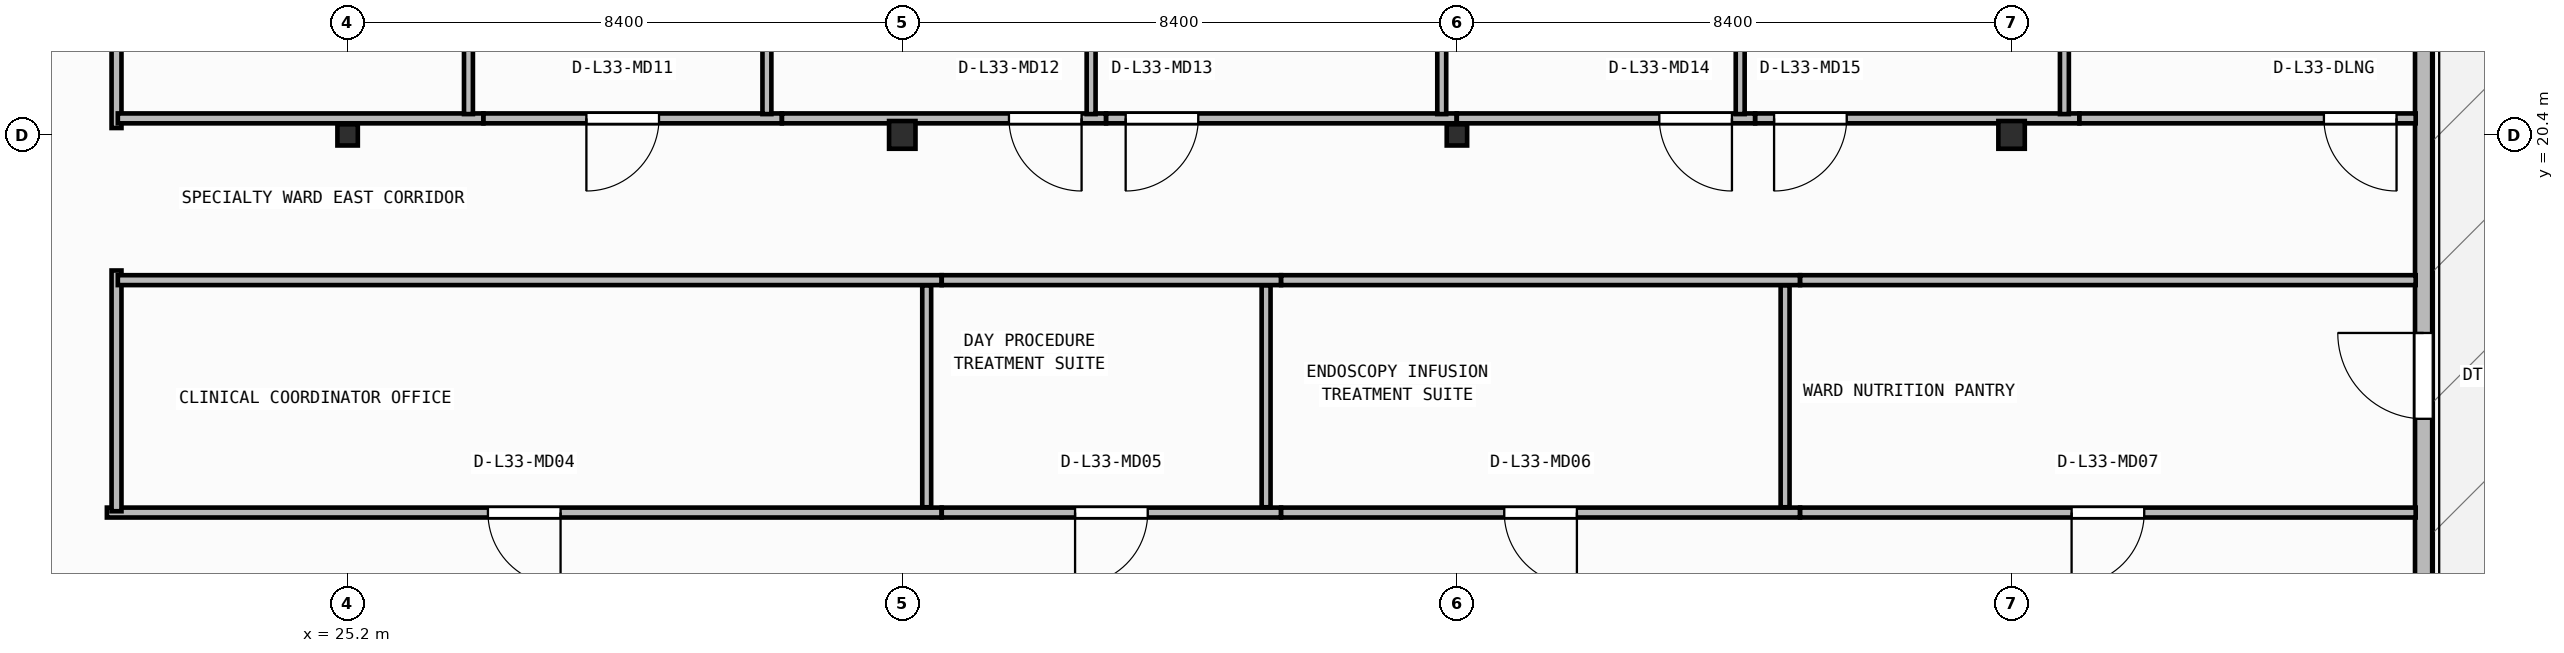
"""IFC4 building model, lengths in metres.
Left out: names, types, materials, properties, quantities, classifications, styles, units other than length and angle.
Written with IfcOpenShell. Run it as: python <this file> out.ifc"""

import sys

from ifc_helpers import new_model, si_unit, direction, frame, frame_2d, origin, origin_2d, place, context, subcontext, project, spatial, rectangle, i_section, extrude, element, fill, save


model = new_model("IFC4")
c1 = context("Model", 3, precision=1e-05, world=origin(), true_north=direction((0.0, 1.0)))
c2 = subcontext(c1, "Body", "Model", "MODEL_VIEW")
j1 = project(units=[si_unit("LENGTHUNIT", "METRE"), si_unit("PLANEANGLEUNIT", "RADIAN")], contexts=[c1])
p1 = place(None, origin())
s1 = spatial("IfcSite", under=j1, at=p1, CompositionType="ELEMENT")
p2 = place(p1, origin())
s2 = spatial("IfcBuilding", under=s1, at=p2, CompositionType="ELEMENT")
p3 = place(p2, frame((0.0, 0.0, 134.95)))
s3 = spatial("IfcBuildingStorey", under=s2, at=p3, CompositionType="ELEMENT", Elevation=134.95)
p4 = place(p3, frame((25.2, 20.4, 0.0), z_axis=(0.0, 0.0, 1.0), x_axis=(1.0, 0.0, 0.0)))
e1 = element("IfcColumn", 1, at=p4, inside=s3, PredefinedType="COLUMN", context=c2, shape_type="SweptSolid", body=[
    extrude(i_section(OverallWidth=0.309, OverallDepth=0.321, WebThickness=0.014, FlangeThickness=0.022, FilletRadius=0.017, at=origin_2d()), origin(), (0.0, 0.0, 1.0), 3.95),
])
p5 = place(p3, frame((33.6, 20.4, 0.0), z_axis=(0.0, 0.0, 1.0), x_axis=(1.0, 0.0, 0.0)))
e2 = element("IfcColumn", 2, at=p5, inside=s3, PredefinedType="COLUMN", context=c2, shape_type="SweptSolid", body=[
    extrude(i_section(OverallWidth=0.4, OverallDepth=0.42, WebThickness=0.025, FlangeThickness=0.04, at=origin_2d()), origin(), (0.0, 0.0, 1.0), 3.95),
])
p6 = place(p3, frame((42.0, 20.4, 0.0), z_axis=(0.0, 0.0, 1.0), x_axis=(1.0, 0.0, 0.0)))
e3 = element("IfcColumn", 3, at=p6, inside=s3, PredefinedType="COLUMN", context=c2, shape_type="SweptSolid", body=[
    extrude(i_section(OverallWidth=0.309, OverallDepth=0.321, WebThickness=0.014, FlangeThickness=0.022, FilletRadius=0.017, at=origin_2d()), origin(), (0.0, 0.0, 1.0), 3.95),
])
p7 = place(p3, frame((50.4, 20.4, 0.0), z_axis=(0.0, 0.0, 1.0), x_axis=(1.0, 0.0, 0.0)))
e4 = element("IfcColumn", 4, at=p7, inside=s3, PredefinedType="COLUMN", context=c2, shape_type="SweptSolid", body=[
    extrude(i_section(OverallWidth=0.4, OverallDepth=0.42, WebThickness=0.025, FlangeThickness=0.04, at=origin_2d()), origin(), (0.0, 0.0, 1.0), 3.95),
])
p8 = place(p3, frame((56.64, 6.86, 0.0), z_axis=(0.0, 0.0, 1.0), x_axis=(0.0, 1.0, 0.0)))
e5 = element("IfcWall", 5, at=p8, inside=s3, PredefinedType="STANDARD", context=c2, shape_type="SweptSolid", body=[
    extrude(rectangle(XDim=23.48, YDim=0.26, at=frame_2d((11.74, 0.0))), origin(), (0.0, 0.0, 1.0), 3.71),
])
p9 = place(p8, frame((9.24, 0.0, 0.0)))
e6 = element("IfcOpeningElement", 6, at=p9, cuts=e5, PredefinedType="OPENING", context=c2, shape_type="SweptSolid", body=[
    extrude(rectangle(XDim=1.3, YDim=2.15, at=frame_2d((0.65, 1.075))), frame((0.0, 0.14, 0.0), z_axis=(0.0, -1.0, 0.0), x_axis=(1.0, 0.0, 0.0)), (0.0, 0.0, 1.0), 0.28),
])
p10 = place(p3, frame((34.196, 14.68, 0.0), z_axis=(0.0, 0.0, 1.0), x_axis=(-1.0, 0.0, 0.0)))
e7 = element("IfcWall", 7, at=p10, inside=s3, PredefinedType="PARTITIONING", context=c2, shape_type="SweptSolid", body=[
    extrude(rectangle(XDim=12.642, YDim=0.15, at=frame_2d((6.321, 0.0))), origin(), (0.0, 0.0, 1.0), 3.71),
])
p11 = place(p10, frame((5.771, 0.0, 0.0)))
e8 = element("IfcOpeningElement", 8, at=p11, cuts=e7, PredefinedType="OPENING", context=c2, shape_type="SweptSolid", body=[
    extrude(rectangle(XDim=1.1, YDim=2.1, at=frame_2d((0.55, 1.05))), frame((0.0, 0.085, 0.0), z_axis=(0.0, -1.0, 0.0), x_axis=(1.0, 0.0, 0.0)), (0.0, 0.0, 1.0), 0.17),
])
p12 = place(p3, frame((39.336, 14.68, 0.0), z_axis=(0.0, 0.0, 1.0), x_axis=(-1.0, 0.0, 0.0)))
e9 = element("IfcWall", 9, at=p12, inside=s3, PredefinedType="PARTITIONING", context=c2, shape_type="SweptSolid", body=[
    extrude(rectangle(XDim=5.138, YDim=0.15, at=frame_2d((2.569, 0.0))), origin(), (0.0, 0.0, 1.0), 3.71),
])
p13 = place(p12, frame((2.019, 0.0, 0.0)))
e10 = element("IfcOpeningElement", 10, at=p13, cuts=e9, PredefinedType="OPENING", context=c2, shape_type="SweptSolid", body=[
    extrude(rectangle(XDim=1.1, YDim=2.1, at=frame_2d((0.55, 1.05))), frame((0.0, 0.085, 0.0), z_axis=(0.0, -1.0, 0.0), x_axis=(1.0, 0.0, 0.0)), (0.0, 0.0, 1.0), 0.17),
])
p14 = place(p3, frame((47.196, 14.68, 0.0), z_axis=(0.0, 0.0, 1.0), x_axis=(-1.0, 0.0, 0.0)))
e11 = element("IfcWall", 11, at=p14, inside=s3, PredefinedType="PARTITIONING", context=c2, shape_type="SweptSolid", body=[
    extrude(rectangle(XDim=7.858, YDim=0.15, at=frame_2d((3.929, 0.0))), origin(), (0.0, 0.0, 1.0), 3.71),
])
p15 = place(p14, frame((3.379, 0.0, 0.0)))
e12 = element("IfcOpeningElement", 12, at=p15, cuts=e11, PredefinedType="OPENING", context=c2, shape_type="SweptSolid", body=[
    extrude(rectangle(XDim=1.1, YDim=2.1, at=frame_2d((0.55, 1.05))), frame((0.0, 0.085, 0.0), z_axis=(0.0, -1.0, 0.0), x_axis=(1.0, 0.0, 0.0)), (0.0, 0.0, 1.0), 0.17),
])
p16 = place(p3, frame((56.52, 14.68, 0.0), z_axis=(0.0, 0.0, 1.0), x_axis=(-1.0, 0.0, 0.0)))
e13 = element("IfcWall", 13, at=p16, inside=s3, PredefinedType="PARTITIONING", context=c2, shape_type="SweptSolid", body=[
    extrude(rectangle(XDim=9.322, YDim=0.15, at=frame_2d((4.661, 0.0))), origin(), (0.0, 0.0, 1.0), 3.71),
])
p17 = place(p16, frame((4.111, 0.0, 0.0)))
e14 = element("IfcOpeningElement", 14, at=p17, cuts=e13, PredefinedType="OPENING", context=c2, shape_type="SweptSolid", body=[
    extrude(rectangle(XDim=1.1, YDim=2.1, at=frame_2d((0.55, 1.05))), frame((0.0, 0.085, 0.0), z_axis=(0.0, -1.0, 0.0), x_axis=(1.0, 0.0, 0.0)), (0.0, 0.0, 1.0), 0.17),
])
p18 = place(p3, frame((21.7, 14.7, 0.0), z_axis=(0.0, 0.0, 1.0), x_axis=(0.0, 1.0, 0.0)))
e15 = element("IfcWall", 15, at=p18, inside=s3, PredefinedType="PARTITIONING", context=c2, shape_type="SweptSolid", body=[
    extrude(rectangle(XDim=3.646, YDim=0.15, at=frame_2d((1.823, 0.0))), origin(), (0.0, 0.0, 1.0), 3.71),
])
p19 = place(p3, frame((21.7, 20.504, 0.0), z_axis=(0.0, 0.0, 1.0), x_axis=(0.0, 1.0, 0.0)))
e16 = element("IfcWall", 16, at=p19, inside=s3, PredefinedType="PARTITIONING", context=c2, shape_type="SweptSolid", body=[
    extrude(rectangle(XDim=6.756, YDim=0.15, at=frame_2d((3.378, 0.0))), origin(), (0.0, 0.0, 1.0), 3.71),
])
p20 = place(p19, frame((2.828, 0.0, 0.0)))
e17 = element("IfcOpeningElement", 17, at=p20, cuts=e16, PredefinedType="OPENING", context=c2, shape_type="SweptSolid", body=[
    extrude(rectangle(XDim=1.1, YDim=2.1, at=frame_2d((0.55, 1.05))), frame((0.0, 0.085, 0.0), z_axis=(0.0, -1.0, 0.0), x_axis=(1.0, 0.0, 0.0)), (0.0, 0.0, 1.0), 0.17),
])
p21 = place(p3, frame((21.72, 18.2, 0.0), z_axis=(0.0, 0.0, 1.0), x_axis=(1.0, 0.0, 0.0)))
e18 = element("IfcWall", 18, at=p21, inside=s3, PredefinedType="PARTITIONING", context=c2, shape_type="SweptSolid", body=[
    extrude(rectangle(XDim=12.476, YDim=0.15, at=frame_2d((6.238, 0.0))), origin(), (0.0, 0.0, 1.0), 3.71),
])
p22 = place(p3, frame((34.198, 18.2, 0.0), z_axis=(0.0, 0.0, 1.0), x_axis=(1.0, 0.0, 0.0)))
e19 = element("IfcWall", 19, at=p22, inside=s3, PredefinedType="PARTITIONING", context=c2, shape_type="SweptSolid", body=[
    extrude(rectangle(XDim=5.138, YDim=0.15, at=frame_2d((2.569, 0.0))), origin(), (0.0, 0.0, 1.0), 3.71),
])
p23 = place(p3, frame((39.338, 18.2, 0.0), z_axis=(0.0, 0.0, 1.0), x_axis=(1.0, 0.0, 0.0)))
e20 = element("IfcWall", 20, at=p23, inside=s3, PredefinedType="PARTITIONING", context=c2, shape_type="SweptSolid", body=[
    extrude(rectangle(XDim=7.858, YDim=0.15, at=frame_2d((3.929, 0.0))), origin(), (0.0, 0.0, 1.0), 3.71),
])
p24 = place(p3, frame((47.198, 18.2, 0.0), z_axis=(0.0, 0.0, 1.0), x_axis=(1.0, 0.0, 0.0)))
e21 = element("IfcWall", 21, at=p24, inside=s3, PredefinedType="PARTITIONING", context=c2, shape_type="SweptSolid", body=[
    extrude(rectangle(XDim=9.322, YDim=0.15, at=frame_2d((4.661, 0.0))), origin(), (0.0, 0.0, 1.0), 3.71),
])
p25 = place(p3, frame((27.256, 20.65, 0.0), z_axis=(0.0, 0.0, 1.0), x_axis=(-1.0, 0.0, 0.0)))
e22 = element("IfcWall", 22, at=p25, inside=s3, PredefinedType="PARTITIONING", context=c2, shape_type="SweptSolid", body=[
    extrude(rectangle(XDim=5.536, YDim=0.15, at=frame_2d((2.768, 0.0))), origin(), (0.0, 0.0, 1.0), 3.083),
])
p26 = place(p3, frame((31.776, 20.65, 0.0), z_axis=(0.0, 0.0, 1.0), x_axis=(-1.0, 0.0, 0.0)))
e23 = element("IfcWall", 23, at=p26, inside=s3, PredefinedType="PARTITIONING", context=c2, shape_type="SweptSolid", body=[
    extrude(rectangle(XDim=4.518, YDim=0.15, at=frame_2d((2.259, 0.0))), origin(), (0.0, 0.0, 1.0), 3.083),
])
p27 = place(p26, frame((1.86, 0.0, 0.0)))
e24 = element("IfcOpeningElement", 24, at=p27, cuts=e23, PredefinedType="OPENING", context=c2, shape_type="SweptSolid", body=[
    extrude(rectangle(XDim=1.1, YDim=2.1, at=frame_2d((0.55, 1.05))), frame((0.0, 0.085, 0.0), z_axis=(0.0, -1.0, 0.0), x_axis=(1.0, 0.0, 0.0)), (0.0, 0.0, 1.0), 0.17),
])
p28 = place(p3, frame((36.686, 20.65, 0.0), z_axis=(0.0, 0.0, 1.0), x_axis=(-1.0, 0.0, 0.0)))
e25 = element("IfcWall", 25, at=p28, inside=s3, PredefinedType="PARTITIONING", context=c2, shape_type="SweptSolid", body=[
    extrude(rectangle(XDim=4.908, YDim=0.15, at=frame_2d((2.454, 0.0))), origin(), (0.0, 0.0, 1.0), 3.083),
])
p29 = place(p28, frame((0.37, 0.0, 0.0)))
e26 = element("IfcOpeningElement", 26, at=p29, cuts=e25, PredefinedType="OPENING", context=c2, shape_type="SweptSolid", body=[
    extrude(rectangle(XDim=1.1, YDim=2.1, at=frame_2d((0.55, 1.05))), frame((0.0, 0.085, 0.0), z_axis=(0.0, -1.0, 0.0), x_axis=(1.0, 0.0, 0.0)), (0.0, 0.0, 1.0), 0.17),
])
p30 = place(p3, frame((41.996, 20.65, 0.0), z_axis=(0.0, 0.0, 1.0), x_axis=(-1.0, 0.0, 0.0)))
e27 = element("IfcWall", 27, at=p30, inside=s3, PredefinedType="PARTITIONING", context=c2, shape_type="SweptSolid", body=[
    extrude(rectangle(XDim=5.308, YDim=0.15, at=frame_2d((2.654, 0.0))), origin(), (0.0, 0.0, 1.0), 3.083),
])
p31 = place(p30, frame((3.913, 0.0, 0.0)))
e28 = element("IfcOpeningElement", 28, at=p31, cuts=e27, PredefinedType="OPENING", context=c2, shape_type="SweptSolid", body=[
    extrude(rectangle(XDim=1.1, YDim=2.1, at=frame_2d((0.55, 1.05))), frame((0.0, 0.085, 0.0), z_axis=(0.0, -1.0, 0.0), x_axis=(1.0, 0.0, 0.0)), (0.0, 0.0, 1.0), 0.17),
])
p32 = place(p3, frame((46.516, 20.65, 0.0), z_axis=(0.0, 0.0, 1.0), x_axis=(-1.0, 0.0, 0.0)))
e29 = element("IfcWall", 29, at=p32, inside=s3, PredefinedType="PARTITIONING", context=c2, shape_type="SweptSolid", body=[
    extrude(rectangle(XDim=4.518, YDim=0.15, at=frame_2d((2.259, 0.0))), origin(), (0.0, 0.0, 1.0), 3.083),
])
p33 = place(p32, frame((0.351, 0.0, 0.0)))
e30 = element("IfcOpeningElement", 30, at=p33, cuts=e29, PredefinedType="OPENING", context=c2, shape_type="SweptSolid", body=[
    extrude(rectangle(XDim=1.1, YDim=2.1, at=frame_2d((0.55, 1.05))), frame((0.0, 0.085, 0.0), z_axis=(0.0, -1.0, 0.0), x_axis=(1.0, 0.0, 0.0)), (0.0, 0.0, 1.0), 0.17),
])
p34 = place(p3, frame((51.426, 20.65, 0.0), z_axis=(0.0, 0.0, 1.0), x_axis=(-1.0, 0.0, 0.0)))
e31 = element("IfcWall", 31, at=p34, inside=s3, PredefinedType="PARTITIONING", context=c2, shape_type="SweptSolid", body=[
    extrude(rectangle(XDim=4.908, YDim=0.15, at=frame_2d((2.454, 0.0))), origin(), (0.0, 0.0, 1.0), 3.083),
])
p35 = place(p34, frame((3.523, 0.0, 0.0)))
e32 = element("IfcOpeningElement", 32, at=p35, cuts=e31, PredefinedType="OPENING", context=c2, shape_type="SweptSolid", body=[
    extrude(rectangle(XDim=1.1, YDim=2.1, at=frame_2d((0.55, 1.05))), frame((0.0, 0.085, 0.0), z_axis=(0.0, -1.0, 0.0), x_axis=(1.0, 0.0, 0.0)), (0.0, 0.0, 1.0), 0.17),
])
p36 = place(p3, frame((56.52, 20.65, 0.0), z_axis=(0.0, 0.0, 1.0), x_axis=(-1.0, 0.0, 0.0)))
e33 = element("IfcWall", 33, at=p36, inside=s3, PredefinedType="PARTITIONING", context=c2, shape_type="SweptSolid", body=[
    extrude(rectangle(XDim=5.092, YDim=0.15, at=frame_2d((2.546, 0.0))), origin(), (0.0, 0.0, 1.0), 3.71),
])
p37 = place(p36, frame((0.29, 0.0, 0.0)))
e34 = element("IfcOpeningElement", 34, at=p37, cuts=e33, PredefinedType="OPENING", context=c2, shape_type="SweptSolid", body=[
    extrude(rectangle(XDim=1.1, YDim=2.1, at=frame_2d((0.55, 1.05))), frame((0.0, 0.085, 0.0), z_axis=(0.0, -1.0, 0.0), x_axis=(1.0, 0.0, 0.0)), (0.0, 0.0, 1.0), 0.17),
])
p38 = place(p3, frame((33.97, 14.76, 0.0), z_axis=(0.0, 0.0, 1.0), x_axis=(0.0, 1.0, 0.0)))
e35 = element("IfcWall", 35, at=p38, inside=s3, PredefinedType="PARTITIONING", context=c2, shape_type="SweptSolid", body=[
    extrude(rectangle(XDim=3.36, YDim=0.135, at=frame_2d((1.68, 0.0))), origin(), (0.0, 0.0, 1.0), 3.152),
])
for number, where, z_axis, x_axis in (
    (36, (39.11, 14.76, 0.0), (0.0, 0.0, 1.0), (0.0, 1.0, 0.0)),
    (37, (46.97, 14.76, 0.0), (0.0, 0.0, 1.0), (0.0, 1.0, 0.0)),
):
    element("IfcWall", number, at=place(p3, frame(where, z_axis=z_axis, x_axis=x_axis)), inside=s3, PredefinedType="PARTITIONING", context=c2, shape_type="SweptSolid", body=[
        extrude(rectangle(XDim=3.36, YDim=0.135, at=frame_2d((1.68, 0.0))), origin(), (0.0, 0.0, 1.0), 3.71),
    ])
for number, where, z_axis, x_axis in (
    (38, (27.03, 20.715, 0.0), (0.0, 0.0, 1.0), (0.0, 1.0, 0.0)),
    (39, (31.55, 20.715, 0.0), (0.0, 0.0, 1.0), (0.0, 1.0, 0.0)),
    (40, (36.46, 20.715, 0.0), (0.0, 0.0, 1.0), (0.0, 1.0, 0.0)),
):
    element("IfcWall", number, at=place(p3, frame(where, z_axis=z_axis, x_axis=x_axis)), inside=s3, PredefinedType="PARTITIONING", context=c2, shape_type="SweptSolid", body=[
        extrude(rectangle(XDim=6.385, YDim=0.135, at=frame_2d((3.192, 0.0))), origin(), (0.0, 0.0, 1.0), 3.71),
    ])
p39 = place(p3, frame((41.77, 20.715, 0.0), z_axis=(0.0, 0.0, 1.0), x_axis=(0.0, 1.0, 0.0)))
e41 = element("IfcWall", 41, at=p39, inside=s3, PredefinedType="PARTITIONING", context=c2, shape_type="SweptSolid", body=[
    extrude(rectangle(XDim=6.385, YDim=0.135, at=frame_2d((3.192, 0.0))), origin(), (0.0, 0.0, 1.0), 3.152),
])
for number, where, z_axis, x_axis in (
    (42, (46.29, 20.715, 0.0), (0.0, 0.0, 1.0), (0.0, 1.0, 0.0)),
    (43, (51.2, 20.715, 0.0), (0.0, 0.0, 1.0), (0.0, 1.0, 0.0)),
):
    element("IfcWall", number, at=place(p3, frame(where, z_axis=z_axis, x_axis=x_axis)), inside=s3, PredefinedType="PARTITIONING", context=c2, shape_type="SweptSolid", body=[
        extrude(rectangle(XDim=6.385, YDim=0.135, at=frame_2d((3.192, 0.0))), origin(), (0.0, 0.0, 1.0), 3.71),
    ])
p40 = place(p9, origin())
e44 = element("IfcDoor", 44, at=p40, inside=s3, OperationType="SINGLE_SWING_RIGHT", PredefinedType="DOOR", context=c2, shape_type="SweptSolid", body=[
    extrude(rectangle(XDim=1.3, YDim=2.15, at=frame_2d((0.65, 1.075))), frame((0.0, 0.025, 0.0), z_axis=(0.0, -1.0, 0.0), x_axis=(1.0, 0.0, 0.0)), (0.0, 0.0, 1.0), 0.05),
])
fill(e6, e44)
p41 = place(p11, origin())
e45 = element("IfcDoor", 45, at=p41, inside=s3, OperationType="SINGLE_SWING_LEFT", PredefinedType="DOOR", context=c2, shape_type="SweptSolid", body=[
    extrude(rectangle(XDim=1.1, YDim=2.1, at=frame_2d((0.55, 1.05))), frame((0.0, 0.025, 0.0), z_axis=(0.0, -1.0, 0.0), x_axis=(1.0, 0.0, 0.0)), (0.0, 0.0, 1.0), 0.05),
])
fill(e8, e45)
p42 = place(p13, origin())
e46 = element("IfcDoor", 46, at=p42, inside=s3, OperationType="SINGLE_SWING_RIGHT", PredefinedType="DOOR", context=c2, shape_type="SweptSolid", body=[
    extrude(rectangle(XDim=1.1, YDim=2.1, at=frame_2d((0.55, 1.05))), frame((0.0, 0.025, 0.0), z_axis=(0.0, -1.0, 0.0), x_axis=(1.0, 0.0, 0.0)), (0.0, 0.0, 1.0), 0.05),
])
fill(e10, e46)
p43 = place(p15, origin())
e47 = element("IfcDoor", 47, at=p43, inside=s3, OperationType="SINGLE_SWING_LEFT", PredefinedType="DOOR", context=c2, shape_type="SweptSolid", body=[
    extrude(rectangle(XDim=1.1, YDim=2.1, at=frame_2d((0.55, 1.05))), frame((0.0, 0.025, 0.0), z_axis=(0.0, -1.0, 0.0), x_axis=(1.0, 0.0, 0.0)), (0.0, 0.0, 1.0), 0.05),
])
fill(e12, e47)
p44 = place(p17, origin())
e48 = element("IfcDoor", 48, at=p44, inside=s3, OperationType="SINGLE_SWING_RIGHT", PredefinedType="DOOR", context=c2, shape_type="SweptSolid", body=[
    extrude(rectangle(XDim=1.1, YDim=2.1, at=frame_2d((0.55, 1.05))), frame((0.0, 0.025, 0.0), z_axis=(0.0, -1.0, 0.0), x_axis=(1.0, 0.0, 0.0)), (0.0, 0.0, 1.0), 0.05),
])
fill(e14, e48)
p45 = place(p27, origin())
e49 = element("IfcDoor", 49, at=p45, inside=s3, OperationType="SINGLE_SWING_RIGHT", PredefinedType="DOOR", context=c2, shape_type="SweptSolid", body=[
    extrude(rectangle(XDim=1.1, YDim=2.1, at=frame_2d((0.55, 1.05))), frame((0.0, 0.025, 0.0), z_axis=(0.0, -1.0, 0.0), x_axis=(1.0, 0.0, 0.0)), (0.0, 0.0, 1.0), 0.05),
])
fill(e24, e49)
p46 = place(p29, origin())
e50 = element("IfcDoor", 50, at=p46, inside=s3, OperationType="SINGLE_SWING_LEFT", PredefinedType="DOOR", context=c2, shape_type="SweptSolid", body=[
    extrude(rectangle(XDim=1.1, YDim=2.1, at=frame_2d((0.55, 1.05))), frame((0.0, 0.025, 0.0), z_axis=(0.0, -1.0, 0.0), x_axis=(1.0, 0.0, 0.0)), (0.0, 0.0, 1.0), 0.05),
])
fill(e26, e50)
p47 = place(p31, origin())
e51 = element("IfcDoor", 51, at=p47, inside=s3, OperationType="SINGLE_SWING_RIGHT", PredefinedType="DOOR", context=c2, shape_type="SweptSolid", body=[
    extrude(rectangle(XDim=1.1, YDim=2.1, at=frame_2d((0.55, 1.05))), frame((0.0, 0.025, 0.0), z_axis=(0.0, -1.0, 0.0), x_axis=(1.0, 0.0, 0.0)), (0.0, 0.0, 1.0), 0.05),
])
fill(e28, e51)
p48 = place(p33, origin())
e52 = element("IfcDoor", 52, at=p48, inside=s3, OperationType="SINGLE_SWING_LEFT", PredefinedType="DOOR", context=c2, shape_type="SweptSolid", body=[
    extrude(rectangle(XDim=1.1, YDim=2.1, at=frame_2d((0.55, 1.05))), frame((0.0, 0.025, 0.0), z_axis=(0.0, -1.0, 0.0), x_axis=(1.0, 0.0, 0.0)), (0.0, 0.0, 1.0), 0.05),
])
fill(e30, e52)
p49 = place(p35, origin())
e53 = element("IfcDoor", 53, at=p49, inside=s3, OperationType="SINGLE_SWING_RIGHT", PredefinedType="DOOR", context=c2, shape_type="SweptSolid", body=[
    extrude(rectangle(XDim=1.1, YDim=2.1, at=frame_2d((0.55, 1.05))), frame((0.0, 0.025, 0.0), z_axis=(0.0, -1.0, 0.0), x_axis=(1.0, 0.0, 0.0)), (0.0, 0.0, 1.0), 0.05),
])
fill(e32, e53)
p50 = place(p37, origin())
e54 = element("IfcDoor", 54, at=p50, inside=s3, OperationType="SINGLE_SWING_LEFT", PredefinedType="DOOR", context=c2, shape_type="SweptSolid", body=[
    extrude(rectangle(XDim=1.1, YDim=2.1, at=frame_2d((0.55, 1.05))), frame((0.0, 0.025, 0.0), z_axis=(0.0, -1.0, 0.0), x_axis=(1.0, 0.0, 0.0)), (0.0, 0.0, 1.0), 0.05),
])
fill(e34, e54)
save(model, sys.argv[1])
